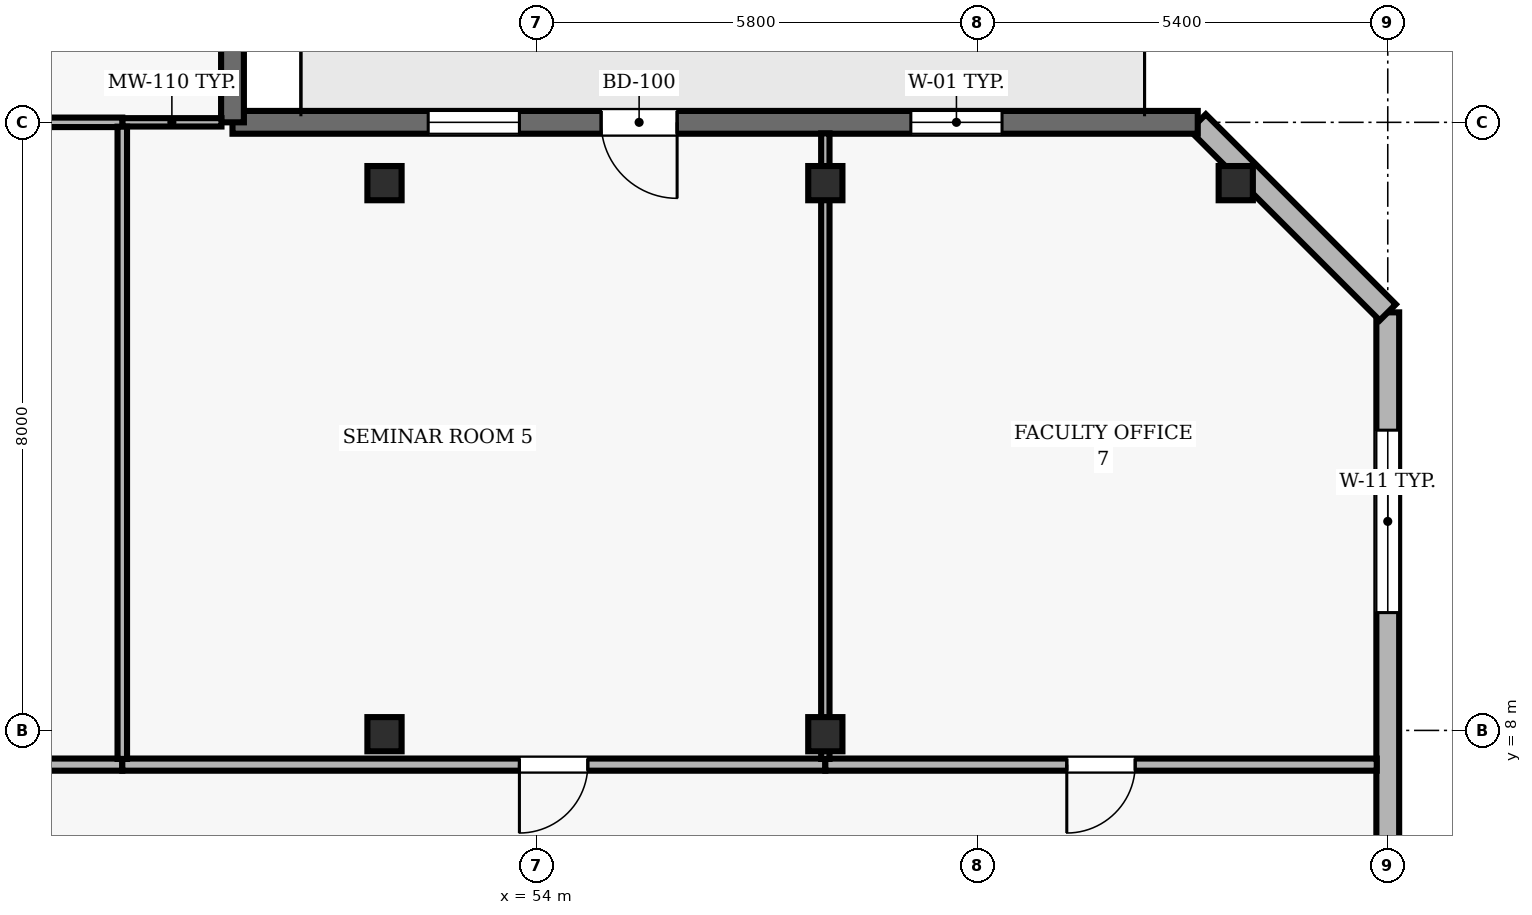
"""IFC4 building model, lengths in metres.
Left out: names, types, materials, properties, quantities, classifications, styles, units other than length and angle.
Written with IfcOpenShell. Run it as: python <this file> out.ifc"""

import sys

from ifc_helpers import new_model, si_unit, direction, frame, frame_2d, origin, origin_2d, place, context, subcontext, project, spatial, rectangle, hollow_rectangle, extrude, element, fill, save


model = new_model("IFC4")
c1 = context("Model", 3, precision=1e-05, world=origin(), true_north=direction((0.0, 1.0)))
c2 = subcontext(c1, "Body", "Model", "MODEL_VIEW")
j1 = project(units=[si_unit("LENGTHUNIT", "METRE"), si_unit("PLANEANGLEUNIT", "RADIAN")], contexts=[c1])
p1 = place(None, origin())
s1 = spatial("IfcSite", under=j1, at=p1, CompositionType="ELEMENT")
p2 = place(p1, origin())
s2 = spatial("IfcBuilding", under=s1, at=p2, CompositionType="ELEMENT")
p3 = place(p2, frame((0.0, 0.0, 183.6)))
s3 = spatial("IfcBuildingStorey", under=s2, at=p3, CompositionType="ELEMENT", Elevation=183.6)
for number, where, z_axis, x_axis in (
    (1, (52.0, 7.95, 0.0), (0.0, 0.0, 1.0), (1.0, 0.0, 0.0)),
    (2, (52.0, 15.2, 0.0), (0.0, 0.0, 1.0), (1.0, 0.0, 0.0)),
    (3, (57.8, 7.95, 0.0), (0.0, 0.0, 1.0), (1.0, 0.0, 0.0)),
    (4, (57.8, 15.2, 0.0), (0.0, 0.0, 1.0), (1.0, 0.0, 0.0)),
    (5, (63.2, 15.2, 0.0), (0.0, 0.0, 1.0), (1.0, 0.0, 0.0)),
):
    element("IfcColumn", number, at=place(p3, frame(where, z_axis=z_axis, x_axis=x_axis)), inside=s3, PredefinedType="COLUMN", context=c2, shape_type="SweptSolid", body=[
        extrude(hollow_rectangle(XDim=0.45, YDim=0.45, WallThickness=0.02, at=origin_2d()), origin(), (0.0, 0.0, 1.0), 3.9),
    ])
p4 = place(p3, frame((65.2, 2.5, 0.0), z_axis=(0.0, 0.0, 1.0), x_axis=(0.0, 1.0, 0.0)))
e6 = element("IfcWall", 6, at=p4, inside=s3, PredefinedType="SOLIDWALL", context=c2, shape_type="SweptSolid", body=[
    extrude(rectangle(XDim=11.0, YDim=0.3, at=frame_2d((5.5, 0.0))), origin(), (0.0, 0.0, 1.0), 3.69),
])
p5 = place(p4, frame((7.05, 0.0, 0.9)))
e7 = element("IfcOpeningElement", 7, at=p5, cuts=e6, PredefinedType="OPENING", context=c2, shape_type="SweptSolid", body=[
    extrude(rectangle(XDim=2.4, YDim=2.2, at=frame_2d((1.2, 1.1))), frame((0.0, 0.16, 0.0), z_axis=(0.0, -1.0, 0.0), x_axis=(1.0, 0.0, 0.0)), (0.0, 0.0, 1.0), 0.32),
])
p6 = place(p3, frame((65.2, 13.5, 0.0), z_axis=(0.0, 0.0, 1.0), x_axis=(-0.707106781187, 0.707106781187, 0.0)))
e8 = element("IfcWall", 8, at=p6, inside=s3, PredefinedType="SOLIDWALL", context=c2, shape_type="SweptSolid", body=[
    extrude(rectangle(XDim=3.536, YDim=0.3, at=frame_2d((1.768, 0.0))), origin(), (0.0, 0.0, 1.0), 3.69),
])
p7 = place(p3, frame((62.7, 16.0, 0.0), z_axis=(0.0, 0.0, 1.0), x_axis=(-1.0, 0.0, 0.0)))
e9 = element("IfcWall", 9, at=p7, inside=s3, PredefinedType="SOLIDWALL", context=c2, shape_type="SweptSolid", body=[
    extrude(rectangle(XDim=12.7, YDim=0.3, at=frame_2d((6.35, 0.0))), origin(), (0.0, 0.0, 1.0), 3.69),
])
p8 = place(p7, frame((6.85, 0.0, 0.0)))
e10 = element("IfcOpeningElement", 10, at=p8, cuts=e9, PredefinedType="OPENING", context=c2, shape_type="SweptSolid", body=[
    extrude(rectangle(XDim=1.0, YDim=2.2, at=frame_2d((0.5, 1.1))), frame((0.0, 0.16, 0.0), z_axis=(0.0, -1.0, 0.0), x_axis=(1.0, 0.0, 0.0)), (0.0, 0.0, 1.0), 0.32),
])
p9 = place(p7, frame((2.575, 0.0, 0.9)))
e11 = element("IfcOpeningElement", 11, at=p9, cuts=e9, PredefinedType="OPENING", context=c2, shape_type="SweptSolid", body=[
    extrude(rectangle(XDim=1.2, YDim=1.6, at=frame_2d((0.6, 0.8))), frame((0.0, 0.16, 0.0), z_axis=(0.0, -1.0, 0.0), x_axis=(1.0, 0.0, 0.0)), (0.0, 0.0, 1.0), 0.32),
])
p10 = place(p7, frame((8.925, 0.0, 0.9)))
e12 = element("IfcOpeningElement", 12, at=p10, cuts=e9, PredefinedType="OPENING", context=c2, shape_type="SweptSolid", body=[
    extrude(rectangle(XDim=1.2, YDim=1.6, at=frame_2d((0.6, 0.8))), frame((0.0, 0.16, 0.0), z_axis=(0.0, -1.0, 0.0), x_axis=(1.0, 0.0, 0.0)), (0.0, 0.0, 1.0), 0.32),
])
p11 = place(p3, frame((50.0, 16.0, 0.0), z_axis=(0.0, 0.0, 1.0), x_axis=(0.0, 1.0, 0.0)))
e13 = element("IfcWall", 13, at=p11, inside=s3, PredefinedType="SOLIDWALL", context=c2, shape_type="SweptSolid", body=[
    extrude(rectangle(XDim=7.44, YDim=0.3, at=frame_2d((3.72, 0.0))), origin(), (0.0, 0.0, 1.0), 3.69),
])
p12 = place(p11, frame((2.97, 0.0, 0.9)))
e14 = element("IfcOpeningElement", 14, at=p12, cuts=e13, PredefinedType="OPENING", context=c2, shape_type="SweptSolid", body=[
    extrude(rectangle(XDim=1.5, YDim=1.6, at=frame_2d((0.75, 0.8))), frame((0.0, 0.16, 0.0), z_axis=(0.0, -1.0, 0.0), x_axis=(1.0, 0.0, 0.0)), (0.0, 0.0, 1.0), 0.32),
])
p13 = place(p3, frame((48.55, 7.55, 0.0), z_axis=(0.0, 0.0, 1.0), x_axis=(-1.0, 0.0, 0.0)))
e15 = element("IfcWall", 15, at=p13, inside=s3, PredefinedType="PARTITIONING", context=c2, shape_type="SweptSolid", body=[
    extrude(rectangle(XDim=8.2, YDim=0.16, at=frame_2d((4.1, 0.0))), origin(), (0.0, 0.0, 1.0), 3.139),
])
p14 = place(p3, frame((48.55, 16.0, 0.0), z_axis=(0.0, 0.0, 1.0), x_axis=(1.0, 0.0, 0.0)))
e16 = element("IfcWall", 16, at=p14, inside=s3, PredefinedType="MOVABLE", context=c2, shape_type="SweptSolid", body=[
    extrude(rectangle(XDim=1.305, YDim=0.11, at=frame_2d((0.652, 0.0))), origin(), (0.0, 0.0, 1.0), 3.39),
])
p15 = place(p3, frame((48.55, 16.0, 0.0), z_axis=(0.0, 0.0, 1.0), x_axis=(-1.0, 0.0, 0.0)))
e17 = element("IfcWall", 17, at=p15, inside=s3, PredefinedType="PARTITIONING", context=c2, shape_type="SweptSolid", body=[
    extrude(rectangle(XDim=8.2, YDim=0.125, at=frame_2d((4.1, 0.0))), origin(), (0.0, 0.0, 1.0), 3.39),
])
p16 = place(p3, frame((57.8, 7.55, 0.0), z_axis=(0.0, 0.0, 1.0), x_axis=(-1.0, 0.0, 0.0)))
e18 = element("IfcWall", 18, at=p16, inside=s3, PredefinedType="PARTITIONING", context=c2, shape_type="SweptSolid", body=[
    extrude(rectangle(XDim=9.25, YDim=0.16, at=frame_2d((4.625, 0.0))), origin(), (0.0, 0.0, 1.0), 3.139),
])
p17 = place(p16, frame((3.125, 0.0, 0.0)))
e19 = element("IfcOpeningElement", 19, at=p17, cuts=e18, PredefinedType="OPENING", context=c2, shape_type="SweptSolid", body=[
    extrude(rectangle(XDim=0.9, YDim=2.1, at=frame_2d((0.45, 1.05))), frame((0.0, 0.09, 0.0), z_axis=(0.0, -1.0, 0.0), x_axis=(1.0, 0.0, 0.0)), (0.0, 0.0, 1.0), 0.18),
])
p18 = place(p3, frame((65.055, 7.55, 0.0), z_axis=(0.0, 0.0, 1.0), x_axis=(-1.0, 0.0, 0.0)))
e20 = element("IfcWall", 20, at=p18, inside=s3, PredefinedType="PARTITIONING", context=c2, shape_type="SweptSolid", body=[
    extrude(rectangle(XDim=7.255, YDim=0.16, at=frame_2d((3.627, 0.0))), origin(), (0.0, 0.0, 1.0), 3.69),
])
p19 = place(p18, frame((3.178, 0.0, 0.0)))
e21 = element("IfcOpeningElement", 21, at=p19, cuts=e20, PredefinedType="OPENING", context=c2, shape_type="SweptSolid", body=[
    extrude(rectangle(XDim=0.9, YDim=2.1, at=frame_2d((0.45, 1.05))), frame((0.0, 0.09, 0.0), z_axis=(0.0, -1.0, 0.0), x_axis=(1.0, 0.0, 0.0)), (0.0, 0.0, 1.0), 0.18),
])
p20 = place(p3, frame((48.55, 7.625, 0.0), z_axis=(0.0, 0.0, 1.0), x_axis=(0.0, 1.0, 0.0)))
e22 = element("IfcWall", 22, at=p20, inside=s3, PredefinedType="PARTITIONING", context=c2, shape_type="SweptSolid", body=[
    extrude(rectangle(XDim=8.318, YDim=0.125, at=frame_2d((4.159, 0.0))), origin(), (0.0, 0.0, 1.0), 3.69),
])
p21 = place(p3, frame((57.8, 7.625, 0.0), z_axis=(0.0, 0.0, 1.0), x_axis=(0.0, 1.0, 0.0)))
e23 = element("IfcWall", 23, at=p21, inside=s3, PredefinedType="MOVABLE", context=c2, shape_type="SweptSolid", body=[
    extrude(rectangle(XDim=8.23, YDim=0.11, at=frame_2d((4.115, 0.0))), origin(), (0.0, 0.0, 1.0), 3.139),
])
p22 = place(p5, origin())
e24 = element("IfcWindow", 24, at=p22, inside=s3, PartitioningType="SINGLE_PANEL", PredefinedType="WINDOW", context=c2, shape_type="SweptSolid", body=[
    extrude(rectangle(XDim=2.4, YDim=2.2, at=frame_2d((1.2, 1.1))), frame((0.0, 0.03, 0.0), z_axis=(0.0, -1.0, 0.0), x_axis=(1.0, 0.0, 0.0)), (0.0, 0.0, 1.0), 0.06),
])
fill(e7, e24)
p23 = place(p8, origin())
e25 = element("IfcDoor", 25, at=p23, inside=s3, OperationType="SINGLE_SWING_LEFT", PredefinedType="DOOR", context=c2, shape_type="SweptSolid", body=[
    extrude(rectangle(XDim=1.0, YDim=2.2, at=frame_2d((0.5, 1.1))), frame((0.0, 0.025, 0.0), z_axis=(0.0, -1.0, 0.0), x_axis=(1.0, 0.0, 0.0)), (0.0, 0.0, 1.0), 0.05),
])
fill(e10, e25)
p24 = place(p9, origin())
e26 = element("IfcWindow", 26, at=p24, inside=s3, PartitioningType="SINGLE_PANEL", PredefinedType="WINDOW", context=c2, shape_type="SweptSolid", body=[
    extrude(rectangle(XDim=1.2, YDim=1.6, at=frame_2d((0.6, 0.8))), frame((0.0, 0.03, 0.0), z_axis=(0.0, -1.0, 0.0), x_axis=(1.0, 0.0, 0.0)), (0.0, 0.0, 1.0), 0.06),
])
fill(e11, e26)
p25 = place(p10, origin())
e27 = element("IfcWindow", 27, at=p25, inside=s3, PartitioningType="SINGLE_PANEL", PredefinedType="WINDOW", context=c2, shape_type="SweptSolid", body=[
    extrude(rectangle(XDim=1.2, YDim=1.6, at=frame_2d((0.6, 0.8))), frame((0.0, 0.03, 0.0), z_axis=(0.0, -1.0, 0.0), x_axis=(1.0, 0.0, 0.0)), (0.0, 0.0, 1.0), 0.06),
])
fill(e12, e27)
p26 = place(p17, origin())
e28 = element("IfcDoor", 28, at=p26, inside=s3, OperationType="SINGLE_SWING_RIGHT", PredefinedType="DOOR", context=c2, shape_type="SweptSolid", body=[
    extrude(rectangle(XDim=0.9, YDim=2.1, at=frame_2d((0.45, 1.05))), frame((0.0, 0.025, 0.0), z_axis=(0.0, -1.0, 0.0), x_axis=(1.0, 0.0, 0.0)), (0.0, 0.0, 1.0), 0.05),
])
fill(e19, e28)
p27 = place(p19, origin())
e29 = element("IfcDoor", 29, at=p27, inside=s3, OperationType="SINGLE_SWING_RIGHT", PredefinedType="DOOR", context=c2, shape_type="SweptSolid", body=[
    extrude(rectangle(XDim=0.9, YDim=2.1, at=frame_2d((0.45, 1.05))), frame((0.0, 0.025, 0.0), z_axis=(0.0, -1.0, 0.0), x_axis=(1.0, 0.0, 0.0)), (0.0, 0.0, 1.0), 0.05),
])
fill(e21, e29)
save(model, sys.argv[1])
